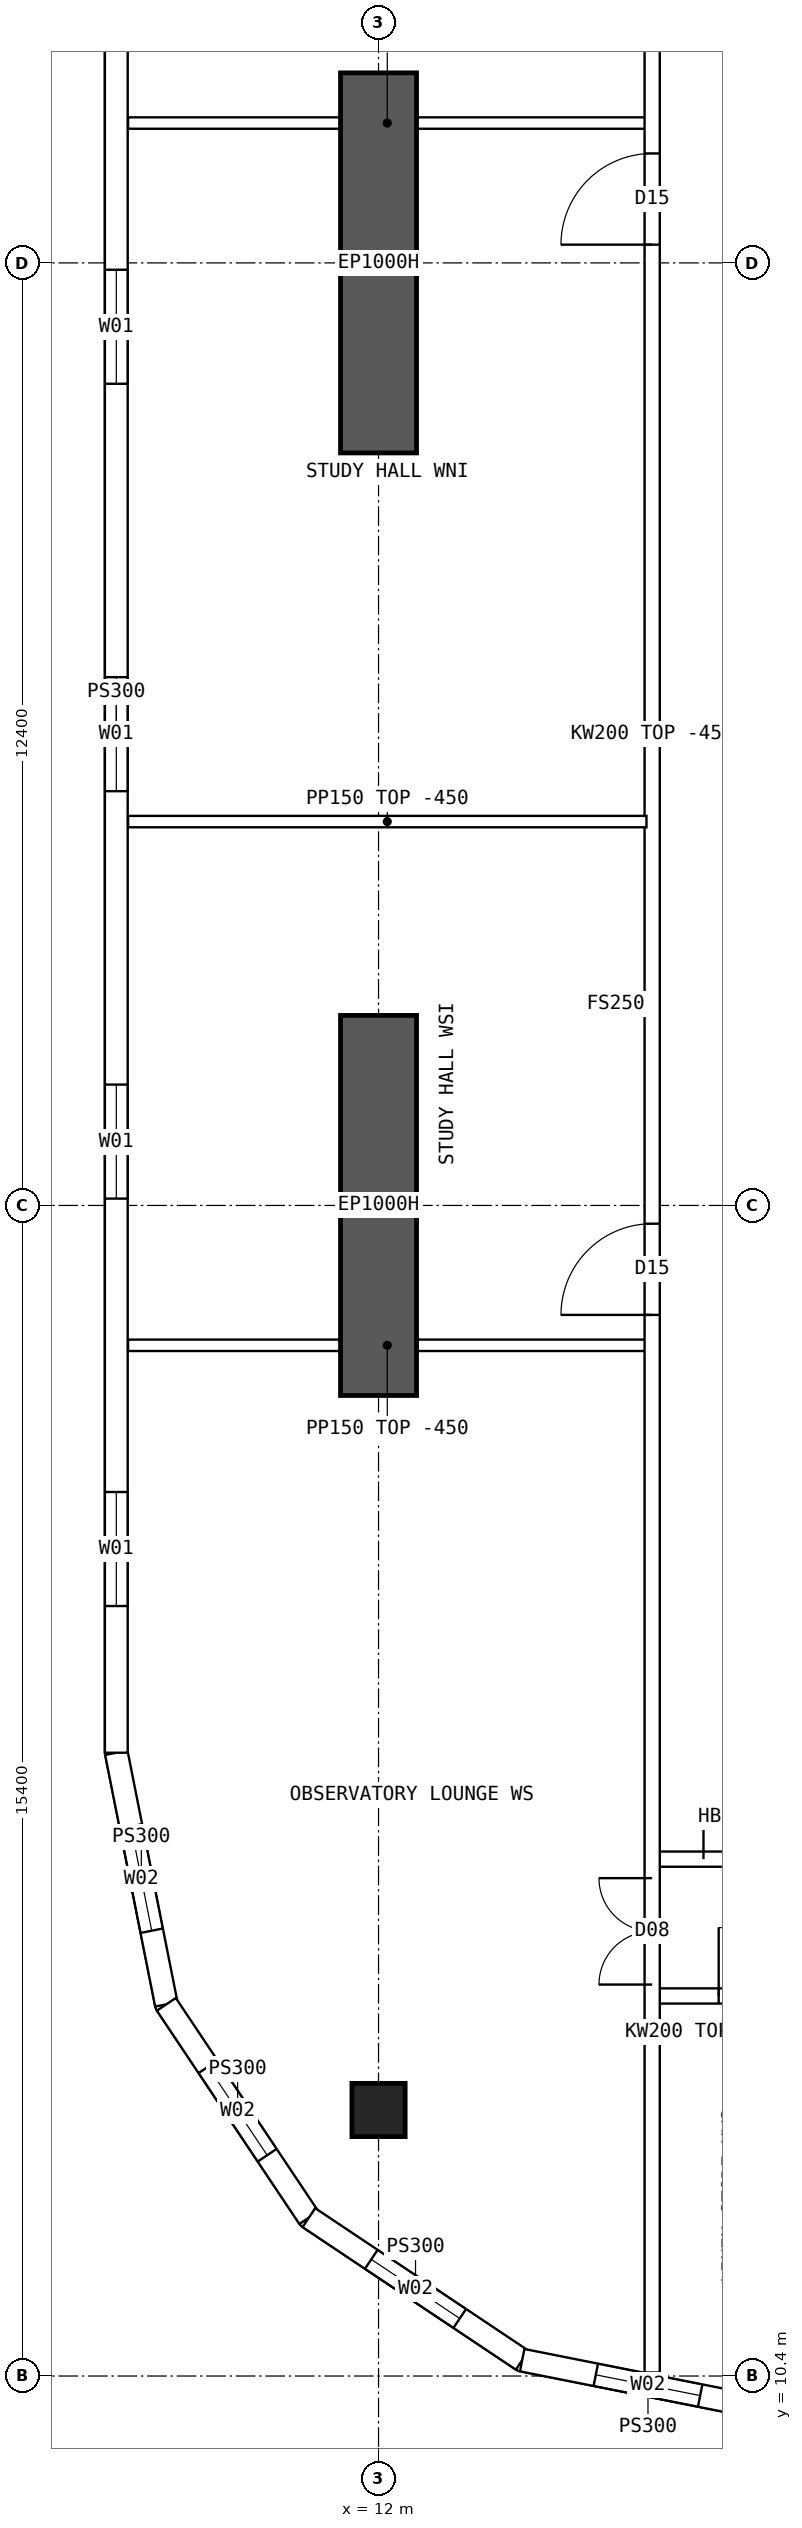
"""IFC4 building model, lengths in metres.
Left out: names, types, materials, properties, quantities, classifications, styles, units other than length and angle.
Written with IfcOpenShell. Run it as: python <this file> out.ifc"""

import sys

from ifc_helpers import new_model, si_unit, direction, frame, frame_2d, origin, origin_2d, place, context, subcontext, project, spatial, polyline, rectangle, hollow_rectangle, outline, extrude, element, fill, save


model = new_model("IFC4")
c1 = context("Model", 3, precision=1e-05, world=origin(), true_north=direction((0.0, 1.0)))
c2 = subcontext(c1, "Body", "Model", "MODEL_VIEW")
j1 = project(units=[si_unit("LENGTHUNIT", "METRE"), si_unit("PLANEANGLEUNIT", "RADIAN")], contexts=[c1])
p1 = place(None, origin())
s1 = spatial("IfcSite", under=j1, at=p1, CompositionType="ELEMENT")
p2 = place(p1, origin())
s2 = spatial("IfcBuilding", under=s1, at=p2, CompositionType="ELEMENT")
p3 = place(p2, frame((0.0, 0.0, 174.85)))
s3 = spatial("IfcBuildingStorey", under=s2, at=p3, CompositionType="ELEMENT", Elevation=174.85)
p4 = place(p3, frame((12.0, 13.9, 0.0), z_axis=(0.0, 0.0, 1.0), x_axis=(1.0, 0.0, 0.0)))
e1 = element("IfcColumn", 1, at=p4, inside=s3, PredefinedType="COLUMN", context=c2, shape_type="SweptSolid", body=[
    extrude(hollow_rectangle(XDim=0.7, YDim=0.7, WallThickness=0.07, at=origin_2d()), origin(), (0.0, 0.0, 1.0), 3.75),
])
for number, where, z_axis, x_axis in (
    (2, (12.0, 23.3, 0.0), (0.0, 0.0, 1.0), (0.0, 1.0, 0.0)),
    (3, (12.0, 35.7, 0.0), (0.0, 0.0, 1.0), (0.0, 1.0, 0.0)),
):
    element("IfcWall", number, at=place(p3, frame(where, z_axis=z_axis, x_axis=x_axis)), inside=s3, PredefinedType="SHEAR", context=c2, shape_type="SweptSolid", body=[
        extrude(rectangle(XDim=5.0, YDim=1.0, at=frame_2d((2.5, 0.0))), origin(), (0.0, 0.0, 1.0), 3.75),
    ])
p5 = place(p3, frame((8.55, 45.4, 0.0), z_axis=(0.0, 0.0, 1.0), x_axis=(0.0, -1.0, 0.0)))
e4 = element("IfcWall", 4, at=p5, inside=s3, PredefinedType="SOLIDWALL", context=c2, shape_type="SweptSolid", body=[
    extrude(outline(polyline([(-0.015, -0.15), (26.815, -0.15), (26.785, 0.15), (0.015, 0.15), (-0.015, -0.15)])), origin(), (0.0, 0.0, 1.0), 3.3),
])
p6 = place(p5, frame((1.93, 0.0, 0.9)))
e5 = element("IfcOpeningElement", 5, at=p6, cuts=e4, PredefinedType="OPENING", context=c2, shape_type="SweptSolid", body=[
    extrude(rectangle(XDim=1.5, YDim=2.0, at=frame_2d((0.75, 1.0))), frame((0.0, 0.16, 0.0), z_axis=(0.0, -1.0, 0.0), x_axis=(1.0, 0.0, 0.0)), (0.0, 0.0, 1.0), 0.32),
])
p7 = place(p5, frame((7.29, 0.0, 0.9)))
e6 = element("IfcOpeningElement", 6, at=p7, cuts=e4, PredefinedType="OPENING", context=c2, shape_type="SweptSolid", body=[
    extrude(rectangle(XDim=1.5, YDim=2.0, at=frame_2d((0.75, 1.0))), frame((0.0, 0.16, 0.0), z_axis=(0.0, -1.0, 0.0), x_axis=(1.0, 0.0, 0.0)), (0.0, 0.0, 1.0), 0.32),
])
p8 = place(p5, frame((12.65, 0.0, 0.9)))
e7 = element("IfcOpeningElement", 7, at=p8, cuts=e4, PredefinedType="OPENING", context=c2, shape_type="SweptSolid", body=[
    extrude(rectangle(XDim=1.5, YDim=2.0, at=frame_2d((0.75, 1.0))), frame((0.0, 0.16, 0.0), z_axis=(0.0, -1.0, 0.0), x_axis=(1.0, 0.0, 0.0)), (0.0, 0.0, 1.0), 0.32),
])
p9 = place(p5, frame((18.01, 0.0, 0.9)))
e8 = element("IfcOpeningElement", 8, at=p9, cuts=e4, PredefinedType="OPENING", context=c2, shape_type="SweptSolid", body=[
    extrude(rectangle(XDim=1.5, YDim=2.0, at=frame_2d((0.75, 1.0))), frame((0.0, 0.16, 0.0), z_axis=(0.0, -1.0, 0.0), x_axis=(1.0, 0.0, 0.0)), (0.0, 0.0, 1.0), 0.32),
])
p10 = place(p5, frame((23.37, 0.0, 0.9)))
e9 = element("IfcOpeningElement", 9, at=p10, cuts=e4, PredefinedType="OPENING", context=c2, shape_type="SweptSolid", body=[
    extrude(rectangle(XDim=1.5, YDim=2.0, at=frame_2d((0.75, 1.0))), frame((0.0, 0.16, 0.0), z_axis=(0.0, -1.0, 0.0), x_axis=(1.0, 0.0, 0.0)), (0.0, 0.0, 1.0), 0.32),
])
p11 = place(p3, frame((8.55, 18.6, 0.0), z_axis=(0.0, 0.0, 1.0), x_axis=(0.19508664885, -0.980786011034, 0.0)))
e10 = element("IfcWall", 10, at=p11, inside=s3, PredefinedType="SOLIDWALL", context=c2, shape_type="SweptSolid", body=[
    extrude(outline(polyline([(-0.015, -0.15), (3.405, -0.15), (3.345, 0.15), (0.015, 0.15), (-0.015, -0.15)])), origin(), (0.0, 0.0, 1.0), 3.3),
])
p12 = place(p11, frame((0.988, 0.0, 0.9)))
e11 = element("IfcOpeningElement", 11, at=p12, cuts=e10, PredefinedType="OPENING", context=c2, shape_type="SweptSolid", body=[
    extrude(rectangle(XDim=1.4, YDim=1.8, at=frame_2d((0.7, 0.9))), frame((0.0, 0.16, 0.0), z_axis=(0.0, -1.0, 0.0), x_axis=(1.0, 0.0, 0.0)), (0.0, 0.0, 1.0), 0.32),
])
p13 = place(p3, frame((9.208, 15.29, 0.0), z_axis=(0.0, 0.0, 1.0), x_axis=(0.555534554399, -0.831493450887, 0.0)))
e12 = element("IfcWall", 12, at=p13, inside=s3, PredefinedType="SOLIDWALL", context=c2, shape_type="SweptSolid", body=[
    extrude(outline(polyline([(-0.03, -0.15), (3.405, -0.15), (3.345, 0.15), (0.03, 0.15), (-0.03, -0.15)])), origin(), (0.0, 0.0, 1.0), 3.3),
])
p14 = place(p13, frame((0.988, 0.0, 0.9)))
e13 = element("IfcOpeningElement", 13, at=p14, cuts=e12, PredefinedType="OPENING", context=c2, shape_type="SweptSolid", body=[
    extrude(rectangle(XDim=1.4, YDim=1.8, at=frame_2d((0.7, 0.9))), frame((0.0, 0.16, 0.0), z_axis=(0.0, -1.0, 0.0), x_axis=(1.0, 0.0, 0.0)), (0.0, 0.0, 1.0), 0.32),
])
p15 = place(p3, frame((11.083, 12.483, 0.0), z_axis=(0.0, 0.0, 1.0), x_axis=(0.831493450887, -0.555534554399, 0.0)))
e14 = element("IfcWall", 14, at=p15, inside=s3, PredefinedType="SOLIDWALL", context=c2, shape_type="SweptSolid", body=[
    extrude(outline(polyline([(-0.03, -0.15), (3.405, -0.15), (3.345, 0.15), (0.03, 0.15), (-0.03, -0.15)])), origin(), (0.0, 0.0, 1.0), 3.3),
])
p16 = place(p15, frame((0.988, 0.0, 0.9)))
e15 = element("IfcOpeningElement", 15, at=p16, cuts=e14, PredefinedType="OPENING", context=c2, shape_type="SweptSolid", body=[
    extrude(rectangle(XDim=1.4, YDim=1.8, at=frame_2d((0.7, 0.9))), frame((0.0, 0.16, 0.0), z_axis=(0.0, -1.0, 0.0), x_axis=(1.0, 0.0, 0.0)), (0.0, 0.0, 1.0), 0.32),
])
p17 = place(p3, frame((13.89, 10.608, 0.0), z_axis=(0.0, 0.0, 1.0), x_axis=(0.98078325777, -0.195100490205, 0.0)))
e16 = element("IfcWall", 16, at=p17, inside=s3, PredefinedType="SOLIDWALL", context=c2, shape_type="SweptSolid", body=[
    extrude(outline(polyline([(-0.03, -0.15), (3.405, -0.15), (3.345, 0.15), (0.03, 0.15), (-0.03, -0.15)])), origin(), (0.0, 0.0, 1.0), 3.3),
])
p18 = place(p17, frame((0.988, 0.0, 0.9)))
e17 = element("IfcOpeningElement", 17, at=p18, cuts=e16, PredefinedType="OPENING", context=c2, shape_type="SweptSolid", body=[
    extrude(rectangle(XDim=1.4, YDim=1.8, at=frame_2d((0.7, 0.9))), frame((0.0, 0.16, 0.0), z_axis=(0.0, -1.0, 0.0), x_axis=(1.0, 0.0, 0.0)), (0.0, 0.0, 1.0), 0.32),
])
p19 = place(p3, frame((15.6, 15.4, 0.0), z_axis=(0.0, 0.0, 1.0), x_axis=(1.0, 0.0, 0.0)))
e18 = element("IfcWall", 18, at=p19, inside=s3, PredefinedType="SOLIDWALL", context=c2, shape_type="SweptSolid", body=[
    extrude(rectangle(XDim=1.975, YDim=0.2, at=frame_2d((0.987, 0.0))), origin(), (0.0, 0.0, 1.0), 3.3),
])
p20 = place(p19, frame((0.875, 0.0, 0.0)))
e19 = element("IfcOpeningElement", 19, at=p20, cuts=e18, PredefinedType="OPENING", context=c2, shape_type="SweptSolid", body=[
    extrude(rectangle(XDim=0.9, YDim=2.1, at=frame_2d((0.45, 1.05))), frame((0.0, 0.11, 0.0), z_axis=(0.0, -1.0, 0.0), x_axis=(1.0, 0.0, 0.0)), (0.0, 0.0, 1.0), 0.22),
])
p21 = place(p3, frame((15.6, 17.2, 0.0), z_axis=(0.0, 0.0, 1.0), x_axis=(1.0, 0.0, 0.0)))
e20 = element("IfcWall", 20, at=p21, inside=s3, PredefinedType="SOLIDWALL", context=c2, shape_type="SweptSolid", body=[
    extrude(rectangle(XDim=1.975, YDim=0.2, at=frame_2d((0.987, 0.0))), origin(), (0.0, 0.0, 1.0), 3.3),
])
p22 = place(p21, frame((0.675, 0.0, 0.0)))
e21 = element("IfcOpeningElement", 21, at=p22, cuts=e20, PredefinedType="OPENING", context=c2, shape_type="SweptSolid", body=[
    extrude(rectangle(XDim=1.2, YDim=2.1, at=frame_2d((0.6, 1.05))), frame((0.0, 0.11, 0.0), z_axis=(0.0, -1.0, 0.0), x_axis=(1.0, 0.0, 0.0)), (0.0, 0.0, 1.0), 0.22),
])
p23 = place(p3, frame((8.705, 30.85, 0.0), z_axis=(0.0, 0.0, 1.0), x_axis=(1.0, 0.0, 0.0)))
e22 = element("IfcWall", 22, at=p23, inside=s3, PredefinedType="PARTITIONING", context=c2, shape_type="SweptSolid", body=[
    extrude(outline(polyline([(0.0, 0.0), (6.82, 0.0), (6.82, 3.3), (3.597, 3.3), (3.595, 2.85), (2.997, 2.85), (2.995, 3.3), (0.0, 3.3), (0.0, 0.0)])), frame((0.0, 0.075, 0.0), z_axis=(0.0, -1.0, 0.0), x_axis=(1.0, 0.0, 0.0)), (0.0, 0.0, 1.0), 0.15),
])
p24 = place(p3, frame((15.6, 10.446, 0.0), z_axis=(0.0, 0.0, 1.0), x_axis=(0.0, 1.0, 0.0)))
e23 = element("IfcWall", 23, at=p24, inside=s3, PredefinedType="SOLIDWALL", context=c2, shape_type="SweptSolid", body=[
    extrude(rectangle(XDim=43.107, YDim=0.2, at=frame_2d((21.554, 0.0))), origin(), (0.0, 0.0, 1.0), 3.3),
])
p25 = place(p24, frame((13.914, 0.0, 0.0)))
e24 = element("IfcOpeningElement", 24, at=p25, cuts=e23, PredefinedType="OPENING", context=c2, shape_type="SweptSolid", body=[
    extrude(rectangle(XDim=1.2, YDim=2.1, at=frame_2d((0.6, 1.05))), frame((0.0, 0.11, 0.0), z_axis=(0.0, -1.0, 0.0), x_axis=(1.0, 0.0, 0.0)), (0.0, 0.0, 1.0), 0.22),
])
p26 = place(p24, frame((27.994, 0.0, 0.0)))
e25 = element("IfcOpeningElement", 25, at=p26, cuts=e23, PredefinedType="OPENING", context=c2, shape_type="SweptSolid", body=[
    extrude(rectangle(XDim=1.2, YDim=2.1, at=frame_2d((0.6, 1.05))), frame((0.0, 0.11, 0.0), z_axis=(0.0, -1.0, 0.0), x_axis=(1.0, 0.0, 0.0)), (0.0, 0.0, 1.0), 0.22),
])
p27 = place(p24, frame((5.104, 0.0, 0.0)))
e26 = element("IfcOpeningElement", 26, at=p27, cuts=e23, PredefinedType="OPENING", context=c2, shape_type="SweptSolid", body=[
    extrude(rectangle(XDim=1.4, YDim=2.1, at=frame_2d((0.7, 1.05))), frame((0.0, 0.11, 0.0), z_axis=(0.0, -1.0, 0.0), x_axis=(1.0, 0.0, 0.0)), (0.0, 0.0, 1.0), 0.22),
])
p28 = place(p24, frame((36.504, 0.0, 0.0)))
e27 = element("IfcOpeningElement", 27, at=p28, cuts=e23, PredefinedType="OPENING", context=c2, shape_type="SweptSolid", body=[
    extrude(rectangle(XDim=1.4, YDim=2.1, at=frame_2d((0.7, 1.05))), frame((0.0, 0.11, 0.0), z_axis=(0.0, -1.0, 0.0), x_axis=(1.0, 0.0, 0.0)), (0.0, 0.0, 1.0), 0.22),
])
for number, where, z_axis, x_axis in (
    (28, (8.705, 23.96, 0.0), (0.0, 0.0, 1.0), (1.0, 0.0, 0.0)),
    (29, (8.705, 40.04, 0.0), (0.0, 0.0, 1.0), (1.0, 0.0, 0.0)),
):
    element("IfcWall", number, at=place(p3, frame(where, z_axis=z_axis, x_axis=x_axis)), inside=s3, PredefinedType="PARTITIONING", context=c2, shape_type="SweptSolid", body=[
        extrude(rectangle(XDim=6.82, YDim=0.15, at=frame_2d((3.41, 0.0))), origin(), (0.0, 0.0, 1.0), 3.3),
    ])
p29 = place(p7, origin())
e30 = element("IfcWindow", 30, at=p29, inside=s3, PartitioningType="SINGLE_PANEL", PredefinedType="WINDOW", context=c2, shape_type="SweptSolid", body=[
    extrude(rectangle(XDim=1.5, YDim=2.0, at=frame_2d((0.75, 1.0))), frame((0.0, 0.03, 0.0), z_axis=(0.0, -1.0, 0.0), x_axis=(1.0, 0.0, 0.0)), (0.0, 0.0, 1.0), 0.06),
])
fill(e6, e30)
p30 = place(p8, origin())
e31 = element("IfcWindow", 31, at=p30, inside=s3, PartitioningType="SINGLE_PANEL", PredefinedType="WINDOW", context=c2, shape_type="SweptSolid", body=[
    extrude(rectangle(XDim=1.5, YDim=2.0, at=frame_2d((0.75, 1.0))), frame((0.0, 0.03, 0.0), z_axis=(0.0, -1.0, 0.0), x_axis=(1.0, 0.0, 0.0)), (0.0, 0.0, 1.0), 0.06),
])
fill(e7, e31)
p31 = place(p9, origin())
e32 = element("IfcWindow", 32, at=p31, inside=s3, PartitioningType="SINGLE_PANEL", PredefinedType="WINDOW", context=c2, shape_type="SweptSolid", body=[
    extrude(rectangle(XDim=1.5, YDim=2.0, at=frame_2d((0.75, 1.0))), frame((0.0, 0.03, 0.0), z_axis=(0.0, -1.0, 0.0), x_axis=(1.0, 0.0, 0.0)), (0.0, 0.0, 1.0), 0.06),
])
fill(e8, e32)
p32 = place(p10, origin())
e33 = element("IfcWindow", 33, at=p32, inside=s3, PartitioningType="SINGLE_PANEL", PredefinedType="WINDOW", context=c2, shape_type="SweptSolid", body=[
    extrude(rectangle(XDim=1.5, YDim=2.0, at=frame_2d((0.75, 1.0))), frame((0.0, 0.03, 0.0), z_axis=(0.0, -1.0, 0.0), x_axis=(1.0, 0.0, 0.0)), (0.0, 0.0, 1.0), 0.06),
])
fill(e9, e33)
p33 = place(p12, origin())
e34 = element("IfcWindow", 34, at=p33, inside=s3, PartitioningType="SINGLE_PANEL", PredefinedType="WINDOW", context=c2, shape_type="SweptSolid", body=[
    extrude(rectangle(XDim=1.4, YDim=1.8, at=frame_2d((0.7, 0.9))), frame((0.0, 0.03, 0.0), z_axis=(0.0, -1.0, 0.0), x_axis=(1.0, 0.0, 0.0)), (0.0, 0.0, 1.0), 0.06),
])
fill(e11, e34)
p34 = place(p14, origin())
e35 = element("IfcWindow", 35, at=p34, inside=s3, PartitioningType="SINGLE_PANEL", PredefinedType="WINDOW", context=c2, shape_type="SweptSolid", body=[
    extrude(rectangle(XDim=1.4, YDim=1.8, at=frame_2d((0.7, 0.9))), frame((0.0, 0.03, 0.0), z_axis=(0.0, -1.0, 0.0), x_axis=(1.0, 0.0, 0.0)), (0.0, 0.0, 1.0), 0.06),
])
fill(e13, e35)
p35 = place(p16, origin())
e36 = element("IfcWindow", 36, at=p35, inside=s3, PartitioningType="SINGLE_PANEL", PredefinedType="WINDOW", context=c2, shape_type="SweptSolid", body=[
    extrude(rectangle(XDim=1.4, YDim=1.8, at=frame_2d((0.7, 0.9))), frame((0.0, 0.03, 0.0), z_axis=(0.0, -1.0, 0.0), x_axis=(1.0, 0.0, 0.0)), (0.0, 0.0, 1.0), 0.06),
])
fill(e15, e36)
p36 = place(p18, origin())
e37 = element("IfcWindow", 37, at=p36, inside=s3, PartitioningType="SINGLE_PANEL", PredefinedType="WINDOW", context=c2, shape_type="SweptSolid", body=[
    extrude(rectangle(XDim=1.4, YDim=1.8, at=frame_2d((0.7, 0.9))), frame((0.0, 0.03, 0.0), z_axis=(0.0, -1.0, 0.0), x_axis=(1.0, 0.0, 0.0)), (0.0, 0.0, 1.0), 0.06),
])
fill(e17, e37)
p37 = place(p22, origin())
e38 = element("IfcDoor", 38, at=p37, inside=s3, OperationType="DOUBLE_DOOR_SINGLE_SWING", PredefinedType="DOOR", context=c2, shape_type="SweptSolid", body=[
    extrude(rectangle(XDim=1.2, YDim=2.1, at=frame_2d((0.6, 1.05))), frame((0.0, 0.025, 0.0), z_axis=(0.0, -1.0, 0.0), x_axis=(1.0, 0.0, 0.0)), (0.0, 0.0, 1.0), 0.05),
])
fill(e21, e38)
p38 = place(p25, origin())
e39 = element("IfcDoor", 39, at=p38, inside=s3, OperationType="SINGLE_SWING_LEFT", PredefinedType="DOOR", context=c2, shape_type="SweptSolid", body=[
    extrude(rectangle(XDim=1.2, YDim=2.1, at=frame_2d((0.6, 1.05))), frame((0.0, 0.025, 0.0), z_axis=(0.0, -1.0, 0.0), x_axis=(1.0, 0.0, 0.0)), (0.0, 0.0, 1.0), 0.05),
])
fill(e24, e39)
p39 = place(p26, origin())
e40 = element("IfcDoor", 40, at=p39, inside=s3, OperationType="SINGLE_SWING_LEFT", PredefinedType="DOOR", context=c2, shape_type="SweptSolid", body=[
    extrude(rectangle(XDim=1.2, YDim=2.1, at=frame_2d((0.6, 1.05))), frame((0.0, 0.025, 0.0), z_axis=(0.0, -1.0, 0.0), x_axis=(1.0, 0.0, 0.0)), (0.0, 0.0, 1.0), 0.05),
])
fill(e25, e40)
p40 = place(p27, origin())
e41 = element("IfcDoor", 41, at=p40, inside=s3, OperationType="DOUBLE_DOOR_SINGLE_SWING", PredefinedType="DOOR", context=c2, shape_type="SweptSolid", body=[
    extrude(rectangle(XDim=1.4, YDim=2.1, at=frame_2d((0.7, 1.05))), frame((0.0, 0.025, 0.0), z_axis=(0.0, -1.0, 0.0), x_axis=(1.0, 0.0, 0.0)), (0.0, 0.0, 1.0), 0.05),
])
fill(e26, e41)
p41 = place(p20, origin())
e42 = element("IfcDoor", 42, at=p41, inside=s3, OperationType="SINGLE_SWING_LEFT", PredefinedType="DOOR", context=c2, shape_type="SweptSolid", body=[
    extrude(rectangle(XDim=0.9, YDim=2.1, at=frame_2d((0.45, 1.05))), frame((0.0, 0.025, 0.0), z_axis=(0.0, -1.0, 0.0), x_axis=(1.0, 0.0, 0.0)), (0.0, 0.0, 1.0), 0.05),
])
fill(e19, e42)
save(model, sys.argv[1])
